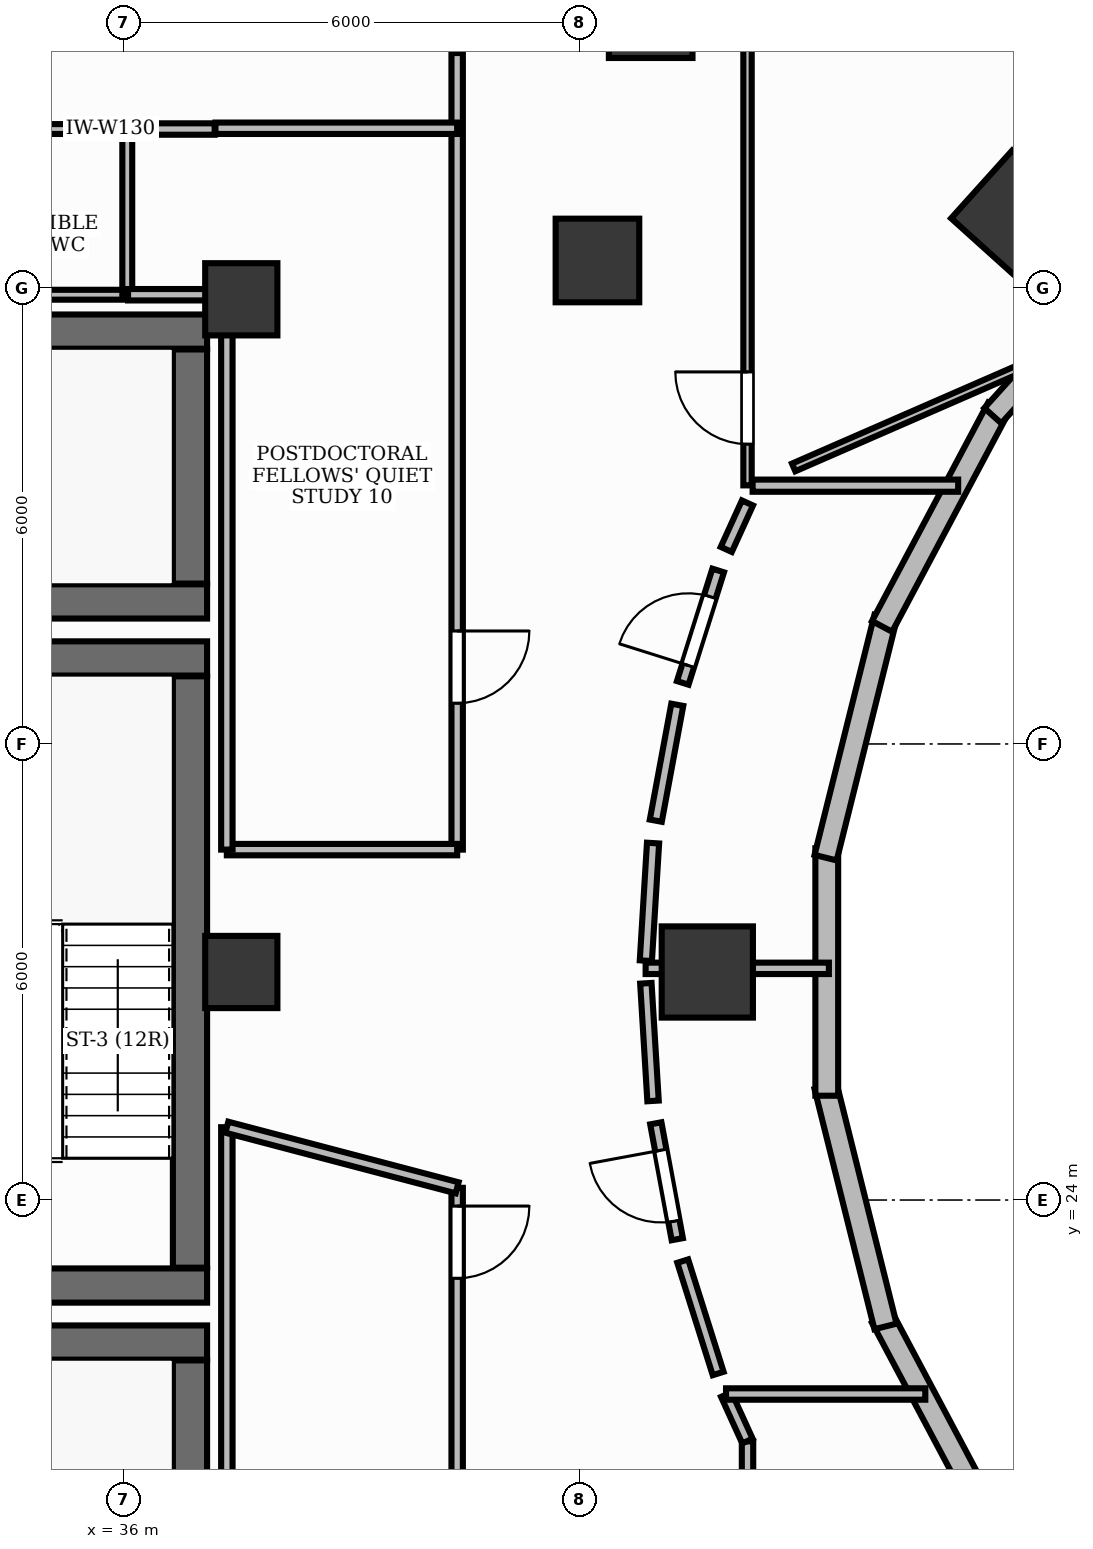
"""IFC4 building model, lengths in metres.
Left out: names, types, materials, properties, quantities, classifications, styles, units other than length and angle.
Written with IfcOpenShell. Run it as: python <this file> out.ifc"""

import sys

from ifc_helpers import new_model, si_unit, direction, frame, frame_2d, origin, origin_2d, place, context, subcontext, project, spatial, rectangle, extrude, element, fill, save


model = new_model("IFC4")
c1 = context("Model", 3, precision=1e-05, world=origin(), true_north=direction((0.0, 1.0)))
c2 = subcontext(c1, "Body", "Model", "MODEL_VIEW")
j1 = project(units=[si_unit("LENGTHUNIT", "METRE"), si_unit("PLANEANGLEUNIT", "RADIAN")], contexts=[c1])
p1 = place(None, origin())
s1 = spatial("IfcSite", under=j1, at=p1, CompositionType="ELEMENT")
p2 = place(p1, origin())
s2 = spatial("IfcBuilding", under=s1, at=p2, CompositionType="ELEMENT")
p3 = place(p2, frame((0.0, 0.0, 111.0)))
s3 = spatial("IfcBuildingStorey", under=s2, at=p3, CompositionType="ELEMENT", Elevation=111.0)
p4 = place(p3, frame((28.852, 35.425, 0.0), z_axis=(0.0, 0.0, 1.0), x_axis=(1.0, 0.0, 0.0)))
e1 = element("IfcWall", 1, at=p4, inside=s3, PredefinedType="SHEAR", context=c2, shape_type="SweptSolid", body=[
    extrude(rectangle(XDim=8.248, YDim=0.45, at=frame_2d((4.124, 0.0))), origin(), (0.0, 0.0, 1.0), 3.9),
])
p5 = place(p3, frame((28.35, 31.875, 0.0), z_axis=(0.0, 0.0, 1.0), x_axis=(1.0, 0.0, 0.0)))
e2 = element("IfcWall", 2, at=p5, inside=s3, PredefinedType="SHEAR", context=c2, shape_type="SweptSolid", body=[
    extrude(rectangle(XDim=8.75, YDim=0.45, at=frame_2d((4.375, 0.0))), origin(), (0.0, 0.0, 1.0), 3.9),
])
p6 = place(p3, frame((36.875, 32.11, 0.0), z_axis=(0.0, 0.0, 1.0), x_axis=(0.0, 1.0, 0.0)))
e3 = element("IfcWall", 3, at=p6, inside=s3, PredefinedType="SHEAR", context=c2, shape_type="SweptSolid", body=[
    extrude(rectangle(XDim=3.08, YDim=0.45, at=frame_2d((1.54, 0.0))), origin(), (0.0, 0.0, 1.0), 3.9),
])
p7 = place(p3, frame((28.35, 22.125, 0.0), z_axis=(0.0, 0.0, 1.0), x_axis=(1.0, 0.0, 0.0)))
e4 = element("IfcWall", 4, at=p7, inside=s3, PredefinedType="SHEAR", context=c2, shape_type="SweptSolid", body=[
    extrude(rectangle(XDim=8.75, YDim=0.45, at=frame_2d((4.375, 0.0))), origin(), (0.0, 0.0, 1.0), 3.9),
])
p8 = place(p3, frame((36.875, 18.81, 0.0), z_axis=(0.0, 0.0, 1.0), x_axis=(0.0, 1.0, 0.0)))
e5 = element("IfcWall", 5, at=p8, inside=s3, PredefinedType="SHEAR", context=c2, shape_type="SweptSolid", body=[
    extrude(rectangle(XDim=3.08, YDim=0.45, at=frame_2d((1.54, 0.0))), origin(), (0.0, 0.0, 1.0), 3.9),
])
for number, where, z_axis, x_axis in (
    (6, (33.1, 31.125, 0.0), (0.0, 0.0, 1.0), (1.0, 0.0, 0.0)),
    (7, (33.1, 22.875, 0.0), (0.0, 0.0, 1.0), (1.0, 0.0, 0.0)),
):
    element("IfcWall", number, at=place(p3, frame(where, z_axis=z_axis, x_axis=x_axis)), inside=s3, PredefinedType="SHEAR", context=c2, shape_type="SweptSolid", body=[
        extrude(rectangle(XDim=4.0, YDim=0.45, at=frame_2d((2.0, 0.0))), origin(), (0.0, 0.0, 1.0), 3.9),
    ])
p9 = place(p3, frame((36.875, 23.11, 0.0), z_axis=(0.0, 0.0, 1.0), x_axis=(0.0, 1.0, 0.0)))
e8 = element("IfcWall", 8, at=p9, inside=s3, PredefinedType="SHEAR", context=c2, shape_type="SweptSolid", body=[
    extrude(rectangle(XDim=7.78, YDim=0.45, at=frame_2d((3.89, 0.0))), origin(), (0.0, 0.0, 1.0), 3.9),
])
for number, where, z_axis, x_axis in (
    (9, (37.55, 35.85, -0.0), (0.0, 0.0, 1.0), (1.0, 0.0, 0.0)),
    (10, (37.55, 27.0, -0.0), (0.0, 0.0, 1.0), (1.0, 0.0, 0.0)),
):
    element("IfcColumn", number, at=place(p3, frame(where, z_axis=z_axis, x_axis=x_axis)), inside=s3, PredefinedType="PILASTER", context=c2, shape_type="SweptSolid", body=[
        extrude(rectangle(XDim=0.95, YDim=0.95, at=origin_2d()), origin(), (0.0, 0.0, 1.0), 3.901),
    ])
p10 = place(p3, frame((42.936, 39.575, -0.0), z_axis=(0.0, 0.0, 1.0), x_axis=(1.0, 0.0, 0.0)))
e11 = element("IfcColumn", 11, at=p10, inside=s3, PredefinedType="COLUMN", context=c2, shape_type="SweptSolid", body=[
    extrude(rectangle(XDim=1.1, YDim=1.1, at=origin_2d()), origin(), (0.0, 0.0, 1.0), 3.901),
])
for number, where, z_axis, x_axis in (
    (12, (43.681, 27.0, -0.0), (0.0, 0.0, 1.0), (0.0, 1.0, 0.0)),
    (13, (47.736, 36.96, -0.0), (0.0, 0.0, 1.0), (0.669, 0.743, 0.0)),
):
    element("IfcColumn", number, at=place(p3, frame(where, z_axis=z_axis, x_axis=x_axis)), inside=s3, PredefinedType="COLUMN", context=c2, shape_type="SweptSolid", body=[
        extrude(rectangle(XDim=1.2, YDim=1.2, at=origin_2d()), origin(), (0.0, 0.0, 1.0), 3.901),
    ])
p11 = place(p3, frame((42.236, 36.361, -0.0), z_axis=(0.0, 0.0, 1.0), x_axis=(1.0, 0.0, 0.0)))
e14 = element("IfcColumn", 14, at=p11, inside=s3, PredefinedType="COLUMN", context=c2, shape_type="SweptSolid", body=[
    extrude(rectangle(XDim=1.1, YDim=1.1, at=origin_2d()), origin(), (0.0, 0.0, 1.0), 3.901),
])
p12 = place(p3, frame((47.509, 19.579, 0.0), z_axis=(0.0, 0.0, 1.0), x_axis=(-0.469451284634, 0.882958374645, 0.0)))
e15 = element("IfcWall", 15, at=p12, inside=s3, PredefinedType="STANDARD", context=c2, shape_type="SweptSolid", body=[
    extrude(rectangle(XDim=3.256, YDim=0.3, at=frame_2d((1.628, 0.0))), origin(), (0.0, 0.0, 1.0), 3.9),
])
p13 = place(p3, frame((46.025, 22.337, 0.0), z_axis=(0.0, 0.0, 1.0), x_axis=(-0.241900409149, 0.970301083197, 0.0)))
e16 = element("IfcWall", 16, at=p13, inside=s3, PredefinedType="STANDARD", context=c2, shape_type="SweptSolid", body=[
    extrude(rectangle(XDim=3.256, YDim=0.3, at=frame_2d((1.628, 0.0))), origin(), (0.0, 0.0, 1.0), 3.9),
])
p14 = place(p3, frame((45.253, 25.372, 0.0), z_axis=(0.0, 0.0, 1.0), x_axis=(0.0, 1.0, 0.0)))
e17 = element("IfcWall", 17, at=p14, inside=s3, PredefinedType="STANDARD", context=c2, shape_type="SweptSolid", body=[
    extrude(rectangle(XDim=3.255, YDim=0.3, at=frame_2d((1.628, 0.0))), origin(), (0.0, 0.0, 1.0), 3.9),
])
p15 = place(p3, frame((45.238, 28.504, 0.0), z_axis=(0.0, 0.0, 1.0), x_axis=(0.241900409149, 0.970301083197, 0.0)))
e18 = element("IfcWall", 18, at=p15, inside=s3, PredefinedType="STANDARD", context=c2, shape_type="SweptSolid", body=[
    extrude(rectangle(XDim=3.256, YDim=0.3, at=frame_2d((1.628, 0.0))), origin(), (0.0, 0.0, 1.0), 3.9),
])
p16 = place(p3, frame((45.98, 31.547, 0.0), z_axis=(0.0, 0.0, 1.0), x_axis=(0.469451284634, 0.882958374645, 0.0)))
e19 = element("IfcWall", 19, at=p16, inside=s3, PredefinedType="STANDARD", context=c2, shape_type="SweptSolid", body=[
    extrude(rectangle(XDim=3.256, YDim=0.3, at=frame_2d((1.628, 0.0))), origin(), (0.0, 0.0, 1.0), 3.9),
])
p17 = place(p3, frame((47.437, 34.319, 0.0), z_axis=(0.0, 0.0, 1.0), x_axis=(0.669167727967, 0.743111399353, 0.0)))
e20 = element("IfcWall", 20, at=p17, inside=s3, PredefinedType="STANDARD", context=c2, shape_type="SweptSolid", body=[
    extrude(rectangle(XDim=3.255, YDim=0.3, at=frame_2d((1.628, 0.0))), origin(), (0.0, 0.0, 1.0), 3.9),
])
p18 = place(p3, frame((33.65, 38.09, 0.0), z_axis=(0.0, 0.0, 1.0), x_axis=(1.0, 0.0, 0.0)))
e21 = element("IfcWall", 21, at=p18, inside=s3, PredefinedType="PARTITIONING", context=c2, shape_type="SweptSolid", body=[
    extrude(rectangle(XDim=2.4, YDim=0.13, at=frame_2d((1.2, 0.0))), origin(), (0.0, 0.0, 1.0), 2.91),
])
p19 = place(p18, frame((0.24, 0.0, 0.0)))
e22 = element("IfcOpeningElement", 22, at=p19, cuts=e21, PredefinedType="OPENING", context=c2, shape_type="SweptSolid", body=[
    extrude(rectangle(XDim=0.9, YDim=2.15, at=frame_2d((0.45, 1.075))), frame((0.0, 0.08, 0.0), z_axis=(0.0, -1.0, 0.0), x_axis=(1.0, 0.0, 0.0)), (0.0, 0.0, 1.0), 0.16),
])
p20 = place(p3, frame((40.39, 24.161, 0.0), z_axis=(0.0, 0.0, 1.0), x_axis=(0.0, -1.0, 0.0)))
e23 = element("IfcWall", 23, at=p20, inside=s3, PredefinedType="PARTITIONING", context=c2, shape_type="SweptSolid", body=[
    extrude(rectangle(XDim=7.661, YDim=0.15, at=frame_2d((3.83, 0.0))), origin(), (0.0, 0.0, 1.0), 2.91),
])
p21 = place(p20, frame((0.24, 0.0, 0.0)))
e24 = element("IfcOpeningElement", 24, at=p21, cuts=e23, PredefinedType="OPENING", context=c2, shape_type="SweptSolid", body=[
    extrude(rectangle(XDim=0.95, YDim=2.15, at=frame_2d((0.475, 1.075))), frame((0.0, 0.09, 0.0), z_axis=(0.0, -1.0, 0.0), x_axis=(1.0, 0.0, 0.0)), (0.0, 0.0, 1.0), 0.18),
])
p22 = place(p3, frame((43.286, 23.485, 0.0), z_axis=(0.0, 0.0, 1.0), x_axis=(-0.182168192784, 0.983267384559, 0.0)))
e25 = element("IfcWall", 25, at=p22, inside=s3, PredefinedType="PARTITIONING", context=c2, shape_type="SweptSolid", body=[
    extrude(rectangle(XDim=1.551, YDim=0.15, at=frame_2d((0.775, 0.0))), origin(), (0.0, 0.0, 1.0), 2.91),
])
p23 = place(p22, frame((0.24, 0.0, 0.0)))
e26 = element("IfcOpeningElement", 26, at=p23, cuts=e25, PredefinedType="OPENING", context=c2, shape_type="SweptSolid", body=[
    extrude(rectangle(XDim=0.95, YDim=2.15, at=frame_2d((0.475, 1.075))), frame((0.0, 0.09, 0.0), z_axis=(0.0, -1.0, 0.0), x_axis=(1.0, 0.0, 0.0)), (0.0, 0.0, 1.0), 0.18),
])
p24 = place(p3, frame((43.358, 30.803, 0.0), z_axis=(0.0, 0.0, 1.0), x_axis=(0.300641414783, 0.953737248783, 0.0)))
e27 = element("IfcWall", 27, at=p24, inside=s3, PredefinedType="PARTITIONING", context=c2, shape_type="SweptSolid", body=[
    extrude(rectangle(XDim=1.55, YDim=0.16, at=frame_2d((0.775, 0.0))), origin(), (0.0, 0.0, 1.0), 2.91),
])
p25 = place(p24, frame((0.24, 0.0, 0.0)))
e28 = element("IfcOpeningElement", 28, at=p25, cuts=e27, PredefinedType="OPENING", context=c2, shape_type="SweptSolid", body=[
    extrude(rectangle(XDim=0.95, YDim=2.15, at=frame_2d((0.475, 1.075))), frame((0.0, 0.095, 0.0), z_axis=(0.0, -1.0, 0.0), x_axis=(1.0, 0.0, 0.0)), (0.0, 0.0, 1.0), 0.19),
])
p26 = place(p3, frame((44.21, 33.402, 0.0), z_axis=(0.0, 0.0, 1.0), x_axis=(0.0, 1.0, 0.0)))
e29 = element("IfcWall", 29, at=p26, inside=s3, PredefinedType="MOVABLE", context=c2, shape_type="SweptSolid", body=[
    extrude(rectangle(XDim=6.238, YDim=0.11, at=frame_2d((3.119, 0.0))), origin(), (0.0, 0.0, 1.0), 2.91),
])
p27 = place(p26, frame((0.542, 0.0, 0.0)))
e30 = element("IfcOpeningElement", 30, at=p27, cuts=e29, PredefinedType="OPENING", context=c2, shape_type="SweptSolid", body=[
    extrude(rectangle(XDim=0.95, YDim=2.15, at=frame_2d((0.475, 1.075))), frame((0.0, 0.07, 0.0), z_axis=(0.0, -1.0, 0.0), x_axis=(1.0, 0.0, 0.0)), (0.0, 0.0, 1.0), 0.14),
])
p28 = place(p3, frame((40.39, 39.09, 0.0), z_axis=(0.0, 0.0, 1.0), x_axis=(0.0, -1.0, 0.0)))
e31 = element("IfcWall", 31, at=p28, inside=s3, PredefinedType="PARTITIONING", context=c2, shape_type="SweptSolid", body=[
    extrude(rectangle(XDim=10.48, YDim=0.15, at=frame_2d((5.24, 0.0))), origin(), (0.0, 0.0, 1.0), 2.91),
])
p29 = place(p28, frame((7.604, 0.0, 0.0)))
e32 = element("IfcOpeningElement", 32, at=p29, cuts=e31, PredefinedType="OPENING", context=c2, shape_type="SweptSolid", body=[
    extrude(rectangle(XDim=0.95, YDim=2.15, at=frame_2d((0.475, 1.075))), frame((0.0, 0.09, 0.0), z_axis=(0.0, -1.0, 0.0), x_axis=(1.0, 0.0, 0.0)), (0.0, 0.0, 1.0), 0.18),
])
p30 = place(p3, frame((36.05, 35.91, 0.0), z_axis=(0.0, 0.0, 1.0), x_axis=(-1.0, 0.0, 0.0)))
e33 = element("IfcWall", 33, at=p30, inside=s3, PredefinedType="PARTITIONING", context=c2, shape_type="SweptSolid", body=[
    extrude(rectangle(XDim=2.4, YDim=0.13, at=frame_2d((1.2, 0.0))), origin(), (0.0, 0.0, 1.0), 2.91),
])
p31 = place(p3, frame((36.05, 38.09, 0.0), z_axis=(0.0, 0.0, 1.0), x_axis=(0.0, -1.0, 0.0)))
e34 = element("IfcWall", 34, at=p31, inside=s3, PredefinedType="PARTITIONING", context=c2, shape_type="SweptSolid", body=[
    extrude(rectangle(XDim=2.18, YDim=0.13, at=frame_2d((1.09, 0.0))), origin(), (0.0, 0.0, 1.0), 2.91),
])
p32 = place(p3, frame((44.21, 16.5, 0.0), z_axis=(0.0, 0.0, 1.0), x_axis=(0.0, 1.0, 0.0)))
e35 = element("IfcWall", 35, at=p32, inside=s3, PredefinedType="PARTITIONING", context=c2, shape_type="SweptSolid", body=[
    extrude(rectangle(XDim=4.325, YDim=0.15, at=frame_2d((2.163, 0.0))), origin(), (0.0, 0.0, 1.0), 2.91),
])
p33 = place(p3, frame((44.209, 20.829, 0.0), z_axis=(0.0, 0.0, 1.0), x_axis=(-0.414377467152, 0.910105111905, 0.0)))
e36 = element("IfcWall", 36, at=p33, inside=s3, PredefinedType="PARTITIONING", context=c2, shape_type="SweptSolid", body=[
    extrude(rectangle(XDim=0.672, YDim=0.15, at=frame_2d((0.336, 0.0))), origin(), (0.0, 0.0, 1.0), 2.91),
])
p34 = place(p3, frame((43.927, 21.448, 0.0), z_axis=(0.0, 0.0, 1.0), x_axis=(1.0, 0.0, 0.0)))
e37 = element("IfcWall", 37, at=p34, inside=s3, PredefinedType="PARTITIONING", context=c2, shape_type="SweptSolid", body=[
    extrude(rectangle(XDim=2.621, YDim=0.15, at=frame_2d((1.311, 0.0))), origin(), (0.0, 0.0, 1.0), 2.91),
])
p35 = place(p3, frame((37.36, 18.764, 0.0), z_axis=(0.0, 0.0, 1.0), x_axis=(0.0, 1.0, 0.0)))
e38 = element("IfcWall", 38, at=p35, inside=s3, PredefinedType="PARTITIONING", context=c2, shape_type="SweptSolid", body=[
    extrude(rectangle(XDim=6.194, YDim=0.15, at=frame_2d((3.097, 0.0))), origin(), (0.0, 0.0, 1.0), 2.91),
])
p36 = place(p3, frame((37.36, 24.958, 0.0), z_axis=(0.0, 0.0, 1.0), x_axis=(0.967070499487, -0.254508642331, 0.0)))
e39 = element("IfcWall", 39, at=p36, inside=s3, PredefinedType="PARTITIONING", context=c2, shape_type="SweptSolid", body=[
    extrude(rectangle(XDim=3.133, YDim=0.15, at=frame_2d((1.566, 0.0))), origin(), (0.0, 0.0, 1.0), 2.91),
])
for number, where, z_axis, x_axis in (
    (40, (43.824, 21.718, 0.0), (0.0, 0.0, 1.0), (-0.301, 0.954, 0.0)),
    (41, (42.967, 25.304, 0.0), (0.0, 0.0, 1.0), (-0.061, 0.998, 0.0)),
):
    element("IfcWall", number, at=place(p3, frame(where, z_axis=z_axis, x_axis=x_axis)), inside=s3, PredefinedType="PARTITIONING", context=c2, shape_type="SweptSolid", body=[
        extrude(rectangle(XDim=1.55, YDim=0.15, at=frame_2d((0.775, 0.0))), origin(), (0.0, 0.0, 1.0), 2.91),
    ])
p37 = place(p3, frame((42.869, 27.048, 0.0), z_axis=(0.0, 0.0, 1.0), x_axis=(1.0, 0.0, 0.0)))
e42 = element("IfcWall", 42, at=p37, inside=s3, PredefinedType="PARTITIONING", context=c2, shape_type="SweptSolid", body=[
    extrude(rectangle(XDim=2.411, YDim=0.15, at=frame_2d((1.206, 0.0))), origin(), (0.0, 0.0, 1.0), 2.91),
])
p38 = place(p3, frame((42.873, 27.149, 0.0), z_axis=(0.0, 0.0, 1.0), x_axis=(0.061103659378, 0.99813142562, 0.0)))
e43 = element("IfcWall", 43, at=p38, inside=s3, PredefinedType="PARTITIONING", context=c2, shape_type="SweptSolid", body=[
    extrude(rectangle(XDim=1.55, YDim=0.16, at=frame_2d((0.775, 0.0))), origin(), (0.0, 0.0, 1.0), 2.91),
])
p39 = place(p3, frame((43.003, 28.991, 0.0), z_axis=(0.0, 0.0, 1.0), x_axis=(0.182168192784, 0.983267384559, 0.0)))
e44 = element("IfcWall", 44, at=p39, inside=s3, PredefinedType="PARTITIONING", context=c2, shape_type="SweptSolid", body=[
    extrude(rectangle(XDim=1.551, YDim=0.16, at=frame_2d((0.775, 0.0))), origin(), (0.0, 0.0, 1.0), 2.91),
])
p40 = place(p3, frame((43.93, 32.559, 0.0), z_axis=(0.0, 0.0, 1.0), x_axis=(0.414377467152, 0.910105111905, 0.0)))
e45 = element("IfcWall", 45, at=p40, inside=s3, PredefinedType="PARTITIONING", context=c2, shape_type="SweptSolid", body=[
    extrude(rectangle(XDim=0.672, YDim=0.16, at=frame_2d((0.336, 0.0))), origin(), (0.0, 0.0, 1.0), 2.91),
])
p41 = place(p3, frame((44.277, 33.398, 0.0), z_axis=(0.0, 0.0, 1.0), x_axis=(1.0, 0.0, 0.0)))
e46 = element("IfcWall", 46, at=p41, inside=s3, PredefinedType="PARTITIONING", context=c2, shape_type="SweptSolid", body=[
    extrude(rectangle(XDim=2.704, YDim=0.16, at=frame_2d((1.352, 0.0))), origin(), (0.0, 0.0, 1.0), 2.91),
])
p42 = place(p3, frame((47.897, 34.982, 0.0), z_axis=(0.0, 0.0, 1.0), x_axis=(-0.916547126563, -0.399926699271, 0.0)))
e47 = element("IfcWall", 47, at=p42, inside=s3, PredefinedType="MOVABLE", context=c2, shape_type="SweptSolid", body=[
    extrude(rectangle(XDim=3.36, YDim=0.11, at=frame_2d((1.68, 0.0))), origin(), (0.0, 0.0, 1.0), 2.91),
])
p43 = place(p3, frame((36.06, 38.09, 0.0), z_axis=(0.0, 0.0, 1.0), x_axis=(1.0, 0.0, 0.0)))
e48 = element("IfcWall", 48, at=p43, inside=s3, PredefinedType="PARTITIONING", context=c2, shape_type="SweptSolid", body=[
    extrude(rectangle(XDim=1.14, YDim=0.15, at=frame_2d((0.57, 0.0))), origin(), (0.0, 0.0, 1.0), 2.91),
])
p44 = place(p3, frame((37.21, 38.1, 0.0), z_axis=(0.0, 0.0, 1.0), x_axis=(1.0, 0.0, 0.0)))
e49 = element("IfcWall", 49, at=p44, inside=s3, PredefinedType="PARTITIONING", context=c2, shape_type="SweptSolid", body=[
    extrude(rectangle(XDim=3.18, YDim=0.15, at=frame_2d((1.59, 0.0))), origin(), (0.0, 0.0, 1.0), 2.91),
])
p45 = place(p3, frame((40.39, 28.61, 0.0), z_axis=(0.0, 0.0, 1.0), x_axis=(-1.0, 0.0, 0.0)))
e50 = element("IfcWall", 50, at=p45, inside=s3, PredefinedType="PARTITIONING", context=c2, shape_type="SweptSolid", body=[
    extrude(rectangle(XDim=3.03, YDim=0.15, at=frame_2d((1.515, 0.0))), origin(), (0.0, 0.0, 1.0), 2.91),
])
p46 = place(p3, frame((37.36, 28.61, 0.0), z_axis=(0.0, 0.0, 1.0), x_axis=(0.0, 1.0, 0.0)))
e51 = element("IfcWall", 51, at=p46, inside=s3, PredefinedType="PARTITIONING", context=c2, shape_type="SweptSolid", body=[
    extrude(rectangle(XDim=7.29, YDim=0.15, at=frame_2d((3.645, 0.0))), origin(), (0.0, 0.0, 1.0), 2.91),
])
p47 = place(p3, frame((37.35, 35.91, 0.0), z_axis=(0.0, 0.0, 1.0), x_axis=(-1.0, 0.0, 0.0)))
e52 = element("IfcWall", 52, at=p47, inside=s3, PredefinedType="PARTITIONING", context=c2, shape_type="SweptSolid", body=[
    extrude(rectangle(XDim=1.29, YDim=0.15, at=frame_2d((0.645, 0.0))), origin(), (0.0, 0.0, 1.0), 2.91),
])
p48 = place(p21, origin())
e53 = element("IfcDoor", 53, at=p48, inside=s3, OperationType="SINGLE_SWING_LEFT", PredefinedType="DOOR", context=c2, shape_type="SweptSolid", body=[
    extrude(rectangle(XDim=0.95, YDim=2.15, at=frame_2d((0.475, 1.075))), frame((0.0, 0.025, 0.0), z_axis=(0.0, -1.0, 0.0), x_axis=(1.0, 0.0, 0.0)), (0.0, 0.0, 1.0), 0.05),
])
fill(e24, e53)
p49 = place(p23, origin())
e54 = element("IfcDoor", 54, at=p49, inside=s3, OperationType="SINGLE_SWING_RIGHT", PredefinedType="DOOR", context=c2, shape_type="SweptSolid", body=[
    extrude(rectangle(XDim=0.95, YDim=2.15, at=frame_2d((0.475, 1.075))), frame((0.0, 0.025, 0.0), z_axis=(0.0, -1.0, 0.0), x_axis=(1.0, 0.0, 0.0)), (0.0, 0.0, 1.0), 0.05),
])
fill(e26, e54)
p50 = place(p25, origin())
e55 = element("IfcDoor", 55, at=p50, inside=s3, OperationType="SINGLE_SWING_LEFT", PredefinedType="DOOR", context=c2, shape_type="SweptSolid", body=[
    extrude(rectangle(XDim=0.95, YDim=2.15, at=frame_2d((0.475, 1.075))), frame((0.0, 0.025, 0.0), z_axis=(0.0, -1.0, 0.0), x_axis=(1.0, 0.0, 0.0)), (0.0, 0.0, 1.0), 0.05),
])
fill(e28, e55)
p51 = place(p27, origin())
e56 = element("IfcDoor", 56, at=p51, inside=s3, OperationType="SINGLE_SWING_RIGHT", PredefinedType="DOOR", context=c2, shape_type="SweptSolid", body=[
    extrude(rectangle(XDim=0.95, YDim=2.15, at=frame_2d((0.475, 1.075))), frame((0.0, 0.025, 0.0), z_axis=(0.0, -1.0, 0.0), x_axis=(1.0, 0.0, 0.0)), (0.0, 0.0, 1.0), 0.05),
])
fill(e30, e56)
p52 = place(p29, origin())
e57 = element("IfcDoor", 57, at=p52, inside=s3, OperationType="SINGLE_SWING_LEFT", PredefinedType="DOOR", context=c2, shape_type="SweptSolid", body=[
    extrude(rectangle(XDim=0.95, YDim=2.15, at=frame_2d((0.475, 1.075))), frame((0.0, 0.025, 0.0), z_axis=(0.0, -1.0, 0.0), x_axis=(1.0, 0.0, 0.0)), (0.0, 0.0, 1.0), 0.05),
])
fill(e32, e57)
save(model, sys.argv[1])
